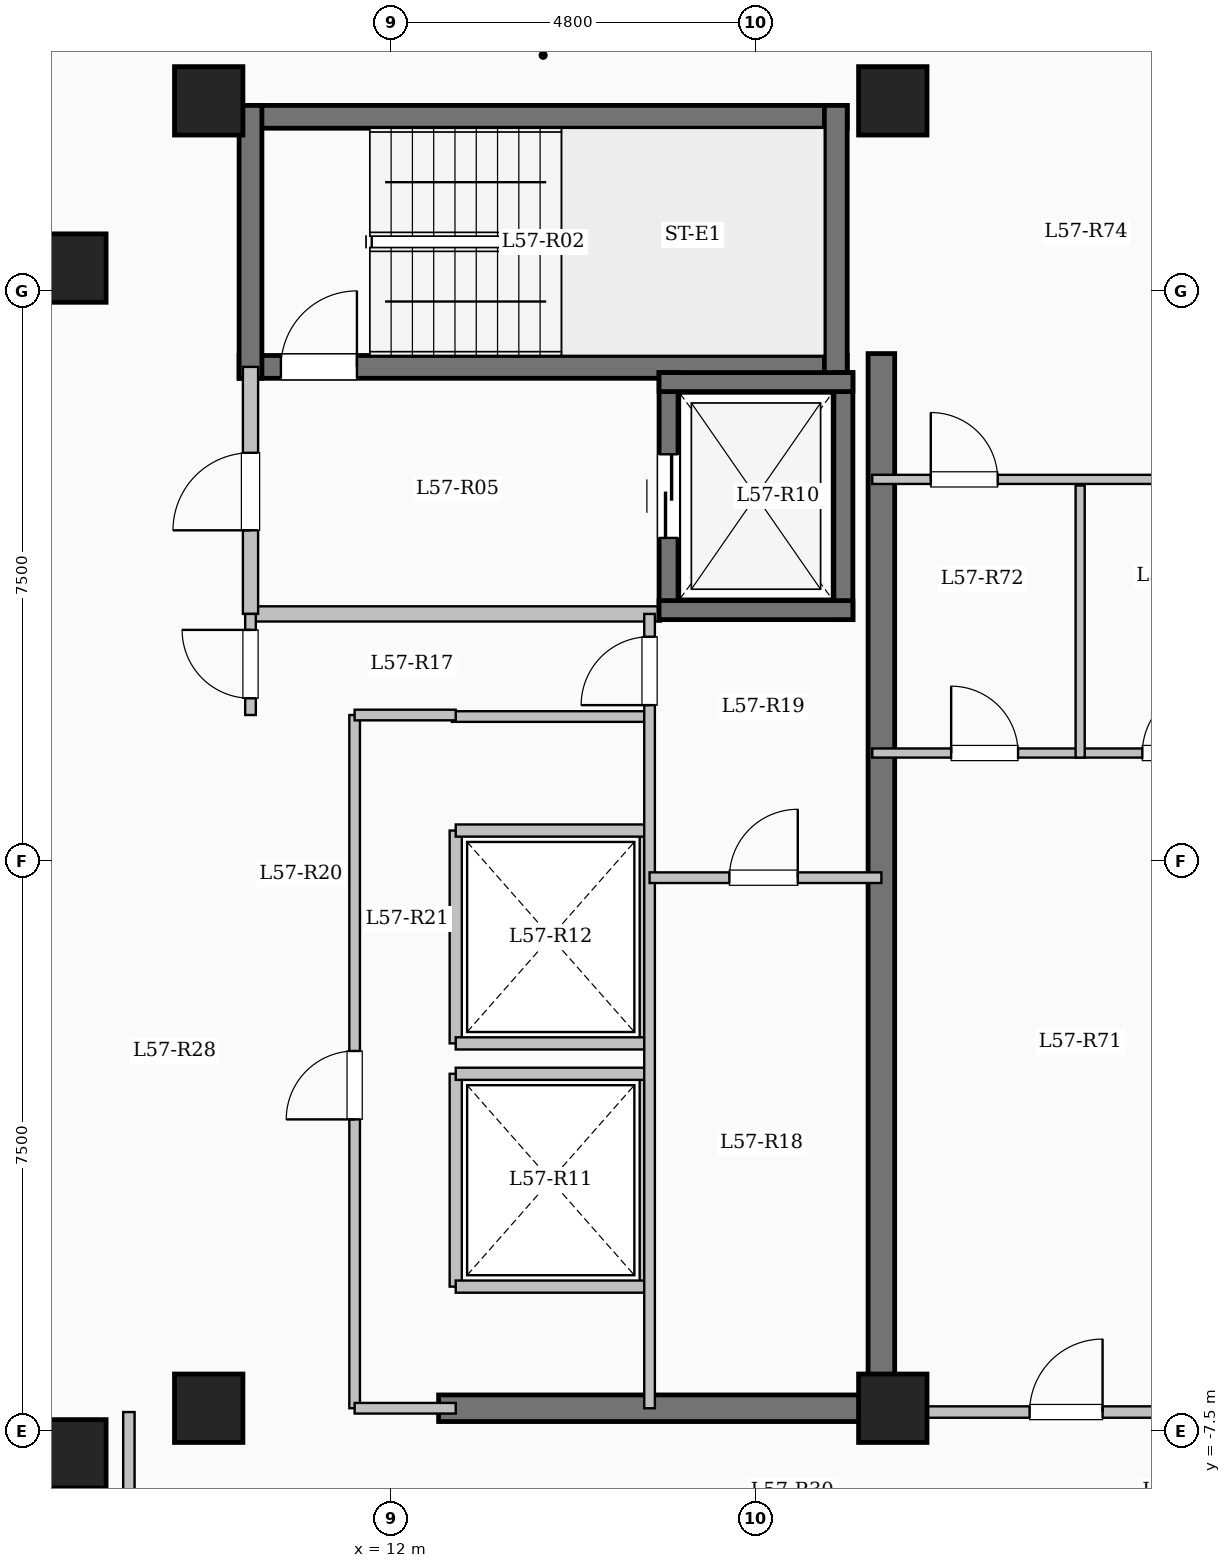
"""IFC4 building model, lengths in metres.
Left out: names, types, materials, properties, quantities, classifications, styles, units other than length and angle.
Written with IfcOpenShell. Run it as: python <this file> out.ifc"""

import sys

from ifc_helpers import new_model, si_unit, direction, frame, frame_2d, origin, origin_2d, place, context, subcontext, project, spatial, rectangle, extrude, element, fill, save


model = new_model("IFC4")
c1 = context("Model", 3, precision=1e-05, world=origin(), true_north=direction((0.0, 1.0)))
c2 = subcontext(c1, "Body", "Model", "MODEL_VIEW")
j1 = project(units=[si_unit("LENGTHUNIT", "METRE"), si_unit("PLANEANGLEUNIT", "RADIAN")], contexts=[c1])
p1 = place(None, origin())
s1 = spatial("IfcSite", under=j1, at=p1, CompositionType="ELEMENT")
p2 = place(p1, origin())
s2 = spatial("IfcBuilding", under=s1, at=p2, CompositionType="ELEMENT")
p3 = place(p2, frame((0.0, 0.0, 210.35)))
s3 = spatial("IfcBuildingStorey", under=s2, at=p3, CompositionType="ELEMENT", Elevation=210.35)
for number, where, z_axis, x_axis in (
    (1, (7.8, -7.8, 0.0), (0.0, 0.0, 1.0), (1.0, 0.0, 0.0)),
    (2, (7.8, 7.8, 0.0), (0.0, 0.0, 1.0), (1.0, 0.0, 0.0)),
    (3, (9.6, -7.2, 0.0), (0.0, 0.0, 1.0), (1.0, 0.0, 0.0)),
    (4, (9.6, 10.0, 0.0), (0.0, 0.0, 1.0), (1.0, 0.0, 0.0)),
    (5, (18.6, -7.2, 0.0), (0.0, 0.0, 1.0), (1.0, 0.0, 0.0)),
    (6, (18.6, 10.0, 0.0), (0.0, 0.0, 1.0), (1.0, 0.0, 0.0)),
):
    element("IfcColumn", number, at=place(p3, frame(where, z_axis=z_axis, x_axis=x_axis)), inside=s3, PredefinedType="COLUMN", context=c2, shape_type="SweptSolid", body=[
        extrude(rectangle(XDim=0.9, YDim=0.9, at=origin_2d()), origin(), (0.0, 0.0, 1.0), 3.35),
    ])
p4 = place(p3, frame((10.0, 9.79, 0.0), z_axis=(0.0, 0.0, 1.0), x_axis=(1.0, 0.0, 0.0)))
e7 = element("IfcWall", 7, at=p4, inside=s3, PredefinedType="SHEAR", context=c2, shape_type="SweptSolid", body=[
    extrude(rectangle(XDim=8.0, YDim=0.3, at=frame_2d((4.0, 0.0))), origin(), (0.0, 0.0, 1.0), 3.35),
])
p5 = place(p3, frame((10.0, 6.5, 0.0), z_axis=(0.0, 0.0, 1.0), x_axis=(1.0, 0.0, 0.0)))
e8 = element("IfcWall", 8, at=p5, inside=s3, PredefinedType="SHEAR", context=c2, shape_type="SweptSolid", body=[
    extrude(rectangle(XDim=8.0, YDim=0.3, at=frame_2d((4.0, 0.0))), origin(), (0.0, 0.0, 1.0), 3.35),
])
p6 = place(p5, frame((0.55, 0.0, 0.0)))
e9 = element("IfcOpeningElement", 9, at=p6, cuts=e8, PredefinedType="OPENING", context=c2, shape_type="SweptSolid", body=[
    extrude(rectangle(XDim=1.0, YDim=2.15, at=frame_2d((0.5, 1.075))), frame((0.0, 0.16, 0.0), z_axis=(0.0, -1.0, 0.0), x_axis=(1.0, 0.0, 0.0)), (0.0, 0.0, 1.0), 0.32),
])
for number, where, z_axis, x_axis in (
    (10, (10.15, 6.35, 0.0), (0.0, 0.0, 1.0), (0.0, 1.0, 0.0)),
    (11, (17.85, 6.35, 0.0), (0.0, 0.0, 1.0), (0.0, 1.0, 0.0)),
):
    element("IfcWall", number, at=place(p3, frame(where, z_axis=z_axis, x_axis=x_axis)), inside=s3, PredefinedType="SHEAR", context=c2, shape_type="SweptSolid", body=[
        extrude(rectangle(XDim=3.59, YDim=0.3, at=frame_2d((1.795, 0.0))), origin(), (0.0, 0.0, 1.0), 3.35),
    ])
p7 = place(p3, frame((10.15, 3.25, 0.0), z_axis=(0.0, 0.0, 1.0), x_axis=(1.0, 0.0, 0.0)))
e12 = element("IfcWall", 12, at=p7, inside=s3, PredefinedType="SOLIDWALL", context=c2, shape_type="SweptSolid", body=[
    extrude(rectangle(XDim=5.4, YDim=0.2, at=frame_2d((2.7, 0.0))), origin(), (0.0, 0.0, 1.0), 3.1),
])
p8 = place(p3, frame((10.15, 3.25, 0.0), z_axis=(0.0, 0.0, 1.0), x_axis=(0.0, 1.0, 0.0)))
e13 = element("IfcWall", 13, at=p8, inside=s3, PredefinedType="SOLIDWALL", context=c2, shape_type="SweptSolid", body=[
    extrude(rectangle(XDim=3.25, YDim=0.2, at=frame_2d((1.625, 0.0))), origin(), (0.0, 0.0, 1.0), 3.1),
])
p9 = place(p8, frame((1.1, 0.0, 0.0)))
e14 = element("IfcOpeningElement", 14, at=p9, cuts=e13, PredefinedType="OPENING", context=c2, shape_type="SweptSolid", body=[
    extrude(rectangle(XDim=1.02, YDim=2.15, at=frame_2d((0.51, 1.075))), frame((0.0, 0.11, 0.0), z_axis=(0.0, -1.0, 0.0), x_axis=(1.0, 0.0, 0.0)), (0.0, 0.0, 1.0), 0.22),
])
p10 = place(p3, frame((15.65, 3.175, 0.0), z_axis=(0.0, 0.0, 1.0), x_axis=(0.0, 1.0, 0.0)))
e15 = element("IfcWall", 15, at=p10, inside=s3, PredefinedType="SHEAR", context=c2, shape_type="SweptSolid", body=[
    extrude(rectangle(XDim=3.25, YDim=0.25, at=frame_2d((1.625, 0.0))), origin(), (0.0, 0.0, 1.0), 3.35),
])
p11 = place(p10, frame((1.075, 0.0, 0.0)))
e16 = element("IfcOpeningElement", 16, at=p11, cuts=e15, PredefinedType="OPENING", context=c2, shape_type="SweptSolid", body=[
    extrude(rectangle(XDim=1.1, YDim=2.15, at=frame_2d((0.55, 1.075))), frame((0.0, 0.135, 0.0), z_axis=(0.0, -1.0, 0.0), x_axis=(1.0, 0.0, 0.0)), (0.0, 0.0, 1.0), 0.27),
])
p12 = place(p3, frame((17.95, 3.175, 0.0), z_axis=(0.0, 0.0, 1.0), x_axis=(0.0, 1.0, 0.0)))
e17 = element("IfcWall", 17, at=p12, inside=s3, PredefinedType="SHEAR", context=c2, shape_type="SweptSolid", body=[
    extrude(rectangle(XDim=3.25, YDim=0.25, at=frame_2d((1.625, 0.0))), origin(), (0.0, 0.0, 1.0), 3.35),
])
for number, where, z_axis, x_axis in (
    (18, (15.525, 3.3, 0.0), (0.0, 0.0, 1.0), (1.0, 0.0, 0.0)),
    (19, (15.525, 6.3, 0.0), (0.0, 0.0, 1.0), (1.0, 0.0, 0.0)),
):
    element("IfcWall", number, at=place(p3, frame(where, z_axis=z_axis, x_axis=x_axis)), inside=s3, PredefinedType="SHEAR", context=c2, shape_type="SweptSolid", body=[
        extrude(rectangle(XDim=2.55, YDim=0.25, at=frame_2d((1.275, 0.0))), origin(), (0.0, 0.0, 1.0), 3.35),
    ])
for number, where, z_axis, x_axis in (
    (20, (12.85, -5.6, 0.0), (0.0, 0.0, 1.0), (0.0, 1.0, 0.0)),
    (21, (15.35, -5.6, 0.0), (0.0, 0.0, 1.0), (0.0, 1.0, 0.0)),
):
    element("IfcWall", number, at=place(p3, frame(where, z_axis=z_axis, x_axis=x_axis)), inside=s3, PredefinedType="SOLIDWALL", context=c2, shape_type="SweptSolid", body=[
        extrude(rectangle(XDim=2.8, YDim=0.16, at=frame_2d((1.4, 0.0))), origin(), (0.0, 0.0, 1.0), 3.1),
    ])
for number, where, z_axis, x_axis in (
    (22, (12.85, -5.6, 0.0), (0.0, 0.0, 1.0), (1.0, 0.0, 0.0)),
    (23, (12.85, -2.8, 0.0), (0.0, 0.0, 1.0), (1.0, 0.0, 0.0)),
):
    element("IfcWall", number, at=place(p3, frame(where, z_axis=z_axis, x_axis=x_axis)), inside=s3, PredefinedType="SOLIDWALL", context=c2, shape_type="SweptSolid", body=[
        extrude(rectangle(XDim=2.5, YDim=0.16, at=frame_2d((1.25, 0.0))), origin(), (0.0, 0.0, 1.0), 3.1),
    ])
for number, where, z_axis, x_axis in (
    (24, (12.85, -2.4, 0.0), (0.0, 0.0, 1.0), (0.0, 1.0, 0.0)),
    (25, (15.35, -2.4, 0.0), (0.0, 0.0, 1.0), (0.0, 1.0, 0.0)),
):
    element("IfcWall", number, at=place(p3, frame(where, z_axis=z_axis, x_axis=x_axis)), inside=s3, PredefinedType="SOLIDWALL", context=c2, shape_type="SweptSolid", body=[
        extrude(rectangle(XDim=2.8, YDim=0.16, at=frame_2d((1.4, 0.0))), origin(), (0.0, 0.0, 1.0), 3.1),
    ])
for number, where, z_axis, x_axis in (
    (26, (12.85, -2.4, 0.0), (0.0, 0.0, 1.0), (1.0, 0.0, 0.0)),
    (27, (12.85, 0.4, 0.0), (0.0, 0.0, 1.0), (1.0, 0.0, 0.0)),
):
    element("IfcWall", number, at=place(p3, frame(where, z_axis=z_axis, x_axis=x_axis)), inside=s3, PredefinedType="SOLIDWALL", context=c2, shape_type="SweptSolid", body=[
        extrude(rectangle(XDim=2.5, YDim=0.16, at=frame_2d((1.25, 0.0))), origin(), (0.0, 0.0, 1.0), 3.1),
    ])
p13 = place(p3, frame((18.45, -7.375, 0.0), z_axis=(0.0, 0.0, 1.0), x_axis=(0.0, 1.0, 0.0)))
e28 = element("IfcWall", 28, at=p13, inside=s3, PredefinedType="SHEAR", context=c2, shape_type="SweptSolid", body=[
    extrude(rectangle(XDim=14.05, YDim=0.35, at=frame_2d((7.025, 0.0))), origin(), (0.0, 0.0, 1.0), 3.35),
])
p14 = place(p3, frame((12.625, -7.2, 0.0), z_axis=(0.0, 0.0, 1.0), x_axis=(1.0, 0.0, 0.0)))
e29 = element("IfcWall", 29, at=p14, inside=s3, PredefinedType="SHEAR", context=c2, shape_type="SweptSolid", body=[
    extrude(rectangle(XDim=6.0, YDim=0.35, at=frame_2d((3.0, 0.0))), origin(), (0.0, 0.0, 1.0), 3.35),
])
p15 = place(p3, frame((12.8, 1.9, 0.0), z_axis=(0.0, 0.0, 1.0), x_axis=(1.0, 0.0, 0.0)))
e30 = element("IfcWall", 30, at=p15, inside=s3, PredefinedType="PARTITIONING", context=c2, shape_type="SweptSolid", body=[
    extrude(rectangle(XDim=2.6, YDim=0.14, at=frame_2d((1.3, 0.0))), origin(), (0.0, 0.0, 1.0), 3.1),
])
p16 = place(p3, frame((10.15, 1.92, 0.0), z_axis=(0.0, 0.0, 1.0), x_axis=(0.0, 1.0, 0.0)))
e31 = element("IfcWall", 31, at=p16, inside=s3, PredefinedType="PARTITIONING", context=c2, shape_type="SweptSolid", body=[
    extrude(rectangle(XDim=1.33, YDim=0.14, at=frame_2d((0.665, 0.0))), origin(), (0.0, 0.0, 1.0), 3.1),
])
p17 = place(p16, frame((0.22, 0.0, 0.0)))
e32 = element("IfcOpeningElement", 32, at=p17, cuts=e31, PredefinedType="OPENING", context=c2, shape_type="SweptSolid", body=[
    extrude(rectangle(XDim=0.9, YDim=2.08, at=frame_2d((0.45, 1.04))), frame((0.0, 0.08, 0.0), z_axis=(0.0, -1.0, 0.0), x_axis=(1.0, 0.0, 0.0)), (0.0, 0.0, 1.0), 0.16),
])
p18 = place(p3, frame((15.4, -7.2, 0.0), z_axis=(0.0, 0.0, 1.0), x_axis=(0.0, 1.0, 0.0)))
e33 = element("IfcWall", 33, at=p18, inside=s3, PredefinedType="PARTITIONING", context=c2, shape_type="SweptSolid", body=[
    extrude(rectangle(XDim=10.45, YDim=0.14, at=frame_2d((5.225, 0.0))), origin(), (0.0, 0.0, 1.0), 3.1),
])
p19 = place(p18, frame((9.25, 0.0, 0.0)))
e34 = element("IfcOpeningElement", 34, at=p19, cuts=e33, PredefinedType="OPENING", context=c2, shape_type="SweptSolid", body=[
    extrude(rectangle(XDim=0.9, YDim=2.08, at=frame_2d((0.45, 1.04))), frame((0.0, 0.08, 0.0), z_axis=(0.0, -1.0, 0.0), x_axis=(1.0, 0.0, 0.0)), (0.0, 0.0, 1.0), 0.16),
])
p20 = place(p3, frame((15.4, -0.22, 0.0), z_axis=(0.0, 0.0, 1.0), x_axis=(1.0, 0.0, 0.0)))
e35 = element("IfcWall", 35, at=p20, inside=s3, PredefinedType="PARTITIONING", context=c2, shape_type="SweptSolid", body=[
    extrude(rectangle(XDim=3.05, YDim=0.14, at=frame_2d((1.525, 0.0))), origin(), (0.0, 0.0, 1.0), 3.1),
])
p21 = place(p20, frame((1.05, 0.0, 0.0)))
e36 = element("IfcOpeningElement", 36, at=p21, cuts=e35, PredefinedType="OPENING", context=c2, shape_type="SweptSolid", body=[
    extrude(rectangle(XDim=0.9, YDim=2.08, at=frame_2d((0.45, 1.04))), frame((0.0, 0.08, 0.0), z_axis=(0.0, -1.0, 0.0), x_axis=(1.0, 0.0, 0.0)), (0.0, 0.0, 1.0), 0.16),
])
p22 = place(p3, frame((11.52, -7.2, 0.0), z_axis=(0.0, 0.0, 1.0), x_axis=(0.0, 1.0, 0.0)))
e37 = element("IfcWall", 37, at=p22, inside=s3, PredefinedType="PARTITIONING", context=c2, shape_type="SweptSolid", body=[
    extrude(rectangle(XDim=9.12, YDim=0.14, at=frame_2d((4.56, 0.0))), origin(), (0.0, 0.0, 1.0), 3.1),
])
p23 = place(p22, frame((3.8, 0.0, 0.0)))
e38 = element("IfcOpeningElement", 38, at=p23, cuts=e37, PredefinedType="OPENING", context=c2, shape_type="SweptSolid", body=[
    extrude(rectangle(XDim=0.9, YDim=2.08, at=frame_2d((0.45, 1.04))), frame((0.0, 0.08, 0.0), z_axis=(0.0, -1.0, 0.0), x_axis=(1.0, 0.0, 0.0)), (0.0, 0.0, 1.0), 0.16),
])
p24 = place(p3, frame((11.52, 1.92, 0.0), z_axis=(0.0, 0.0, 1.0), x_axis=(1.0, 0.0, 0.0)))
e39 = element("IfcWall", 39, at=p24, inside=s3, PredefinedType="PARTITIONING", context=c2, shape_type="SweptSolid", body=[
    extrude(rectangle(XDim=1.33, YDim=0.14, at=frame_2d((0.665, 0.0))), origin(), (0.0, 0.0, 1.0), 3.1),
])
p25 = place(p3, frame((11.52, -7.2, 0.0), z_axis=(0.0, 0.0, 1.0), x_axis=(1.0, 0.0, 0.0)))
e40 = element("IfcWall", 40, at=p25, inside=s3, PredefinedType="PARTITIONING", context=c2, shape_type="SweptSolid", body=[
    extrude(rectangle(XDim=1.33, YDim=0.14, at=frame_2d((0.665, 0.0))), origin(), (0.0, 0.0, 1.0), 2.235),
])
p26 = place(p3, frame((8.55, -9.4, 0.0), z_axis=(0.0, 0.0, 1.0), x_axis=(0.0, 1.0, 0.0)))
e41 = element("IfcWall", 41, at=p26, inside=s3, PredefinedType="PARTITIONING", context=c2, shape_type="SweptSolid", body=[
    extrude(rectangle(XDim=2.15, YDim=0.15, at=frame_2d((1.075, 0.0))), origin(), (0.0, 0.0, 1.0), 3.1),
])
p27 = place(p3, frame((18.45, -7.25, 0.0), z_axis=(0.0, 0.0, 1.0), x_axis=(1.0, 0.0, 0.0)))
e42 = element("IfcWall", 42, at=p27, inside=s3, PredefinedType="PARTITIONING", context=c2, shape_type="SweptSolid", body=[
    extrude(rectangle(XDim=5.13, YDim=0.15, at=frame_2d((2.565, 0.0))), origin(), (0.0, 0.0, 1.0), 3.1),
])
p28 = place(p27, frame((1.95, 0.0, 0.0)))
e43 = element("IfcOpeningElement", 43, at=p28, cuts=e42, PredefinedType="OPENING", context=c2, shape_type="SweptSolid", body=[
    extrude(rectangle(XDim=0.96, YDim=2.15, at=frame_2d((0.48, 1.075))), frame((0.0, 0.085, 0.0), z_axis=(0.0, -1.0, 0.0), x_axis=(1.0, 0.0, 0.0)), (0.0, 0.0, 1.0), 0.17),
])
p29 = place(p3, frame((18.33, 1.42, 0.0), z_axis=(0.0, 0.0, 1.0), x_axis=(1.0, 0.0, 0.0)))
e44 = element("IfcWall", 44, at=p29, inside=s3, PredefinedType="PARTITIONING", context=c2, shape_type="SweptSolid", body=[
    extrude(rectangle(XDim=5.37, YDim=0.12, at=frame_2d((2.685, 0.0))), origin(), (0.0, 0.0, 1.0), 3.1),
])
p30 = place(p29, frame((1.038, 0.0, 0.0)))
e45 = element("IfcOpeningElement", 45, at=p30, cuts=e44, PredefinedType="OPENING", context=c2, shape_type="SweptSolid", body=[
    extrude(rectangle(XDim=0.88, YDim=2.1, at=frame_2d((0.44, 1.05))), frame((0.0, 0.07, 0.0), z_axis=(0.0, -1.0, 0.0), x_axis=(1.0, 0.0, 0.0)), (0.0, 0.0, 1.0), 0.14),
])
p31 = place(p29, frame((3.553, 0.0, 0.0)))
e46 = element("IfcOpeningElement", 46, at=p31, cuts=e44, PredefinedType="OPENING", context=c2, shape_type="SweptSolid", body=[
    extrude(rectangle(XDim=0.88, YDim=2.1, at=frame_2d((0.44, 1.05))), frame((0.0, 0.07, 0.0), z_axis=(0.0, -1.0, 0.0), x_axis=(1.0, 0.0, 0.0)), (0.0, 0.0, 1.0), 0.14),
])
p32 = place(p3, frame((18.33, 5.02, 0.0), z_axis=(0.0, 0.0, 1.0), x_axis=(1.0, 0.0, 0.0)))
e47 = element("IfcWall", 47, at=p32, inside=s3, PredefinedType="PARTITIONING", context=c2, shape_type="SweptSolid", body=[
    extrude(rectangle(XDim=5.37, YDim=0.12, at=frame_2d((2.685, 0.0))), origin(), (0.0, 0.0, 1.0), 3.1),
])
p33 = place(p32, frame((0.77, 0.0, 0.0)))
e48 = element("IfcOpeningElement", 48, at=p33, cuts=e47, PredefinedType="OPENING", context=c2, shape_type="SweptSolid", body=[
    extrude(rectangle(XDim=0.88, YDim=2.1, at=frame_2d((0.44, 1.05))), frame((0.0, 0.07, 0.0), z_axis=(0.0, -1.0, 0.0), x_axis=(1.0, 0.0, 0.0)), (0.0, 0.0, 1.0), 0.14),
])
p34 = place(p3, frame((21.065, 1.36, 0.0), z_axis=(0.0, 0.0, 1.0), x_axis=(0.0, 1.0, 0.0)))
e49 = element("IfcWall", 49, at=p34, inside=s3, PredefinedType="PARTITIONING", context=c2, shape_type="SweptSolid", body=[
    extrude(rectangle(XDim=3.58, YDim=0.12, at=frame_2d((1.79, 0.0))), origin(), (0.0, 0.0, 1.0), 3.1),
])
p35 = place(p6, origin())
e50 = element("IfcDoor", 50, at=p35, inside=s3, OperationType="SINGLE_SWING_RIGHT", PredefinedType="DOOR", context=c2, shape_type="SweptSolid", body=[
    extrude(rectangle(XDim=1.0, YDim=2.15, at=frame_2d((0.5, 1.075))), frame((0.0, 0.025, 0.0), z_axis=(0.0, -1.0, 0.0), x_axis=(1.0, 0.0, 0.0)), (0.0, 0.0, 1.0), 0.05),
])
fill(e9, e50)
p36 = place(p9, origin())
e51 = element("IfcDoor", 51, at=p36, inside=s3, OperationType="SINGLE_SWING_LEFT", PredefinedType="DOOR", context=c2, shape_type="SweptSolid", body=[
    extrude(rectangle(XDim=1.02, YDim=2.15, at=frame_2d((0.51, 1.075))), frame((0.0, 0.025, 0.0), z_axis=(0.0, -1.0, 0.0), x_axis=(1.0, 0.0, 0.0)), (0.0, 0.0, 1.0), 0.05),
])
fill(e14, e51)
p37 = place(p11, origin())
e52 = element("IfcDoor", 52, at=p37, inside=s3, OperationType="SLIDING_TO_LEFT", PredefinedType="DOOR", context=c2, shape_type="SweptSolid", body=[
    extrude(rectangle(XDim=1.1, YDim=2.15, at=frame_2d((0.55, 1.075))), frame((0.0, 0.025, 0.0), z_axis=(0.0, -1.0, 0.0), x_axis=(1.0, 0.0, 0.0)), (0.0, 0.0, 1.0), 0.05),
])
fill(e16, e52)
p38 = place(p17, origin())
e53 = element("IfcDoor", 53, at=p38, inside=s3, OperationType="SINGLE_SWING_RIGHT", PredefinedType="DOOR", context=c2, shape_type="SweptSolid", body=[
    extrude(rectangle(XDim=0.9, YDim=2.08, at=frame_2d((0.45, 1.04))), frame((0.0, 0.025, 0.0), z_axis=(0.0, -1.0, 0.0), x_axis=(1.0, 0.0, 0.0)), (0.0, 0.0, 1.0), 0.05),
])
fill(e32, e53)
p39 = place(p19, origin())
e54 = element("IfcDoor", 54, at=p39, inside=s3, OperationType="SINGLE_SWING_LEFT", PredefinedType="DOOR", context=c2, shape_type="SweptSolid", body=[
    extrude(rectangle(XDim=0.9, YDim=2.08, at=frame_2d((0.45, 1.04))), frame((0.0, 0.025, 0.0), z_axis=(0.0, -1.0, 0.0), x_axis=(1.0, 0.0, 0.0)), (0.0, 0.0, 1.0), 0.05),
])
fill(e34, e54)
p40 = place(p21, origin())
e55 = element("IfcDoor", 55, at=p40, inside=s3, OperationType="SINGLE_SWING_RIGHT", PredefinedType="DOOR", context=c2, shape_type="SweptSolid", body=[
    extrude(rectangle(XDim=0.9, YDim=2.08, at=frame_2d((0.45, 1.04))), frame((0.0, 0.025, 0.0), z_axis=(0.0, -1.0, 0.0), x_axis=(1.0, 0.0, 0.0)), (0.0, 0.0, 1.0), 0.05),
])
fill(e36, e55)
p41 = place(p23, origin())
e56 = element("IfcDoor", 56, at=p41, inside=s3, OperationType="SINGLE_SWING_LEFT", PredefinedType="DOOR", context=c2, shape_type="SweptSolid", body=[
    extrude(rectangle(XDim=0.9, YDim=2.08, at=frame_2d((0.45, 1.04))), frame((0.0, 0.025, 0.0), z_axis=(0.0, -1.0, 0.0), x_axis=(1.0, 0.0, 0.0)), (0.0, 0.0, 1.0), 0.05),
])
fill(e38, e56)
p42 = place(p28, origin())
e57 = element("IfcDoor", 57, at=p42, inside=s3, OperationType="SINGLE_SWING_RIGHT", PredefinedType="DOOR", context=c2, shape_type="SweptSolid", body=[
    extrude(rectangle(XDim=0.96, YDim=2.15, at=frame_2d((0.48, 1.075))), frame((0.0, 0.025, 0.0), z_axis=(0.0, -1.0, 0.0), x_axis=(1.0, 0.0, 0.0)), (0.0, 0.0, 1.0), 0.05),
])
fill(e43, e57)
p43 = place(p30, origin())
e58 = element("IfcDoor", 58, at=p43, inside=s3, OperationType="SINGLE_SWING_LEFT", PredefinedType="DOOR", context=c2, shape_type="SweptSolid", body=[
    extrude(rectangle(XDim=0.88, YDim=2.1, at=frame_2d((0.44, 1.05))), frame((0.0, 0.025, 0.0), z_axis=(0.0, -1.0, 0.0), x_axis=(1.0, 0.0, 0.0)), (0.0, 0.0, 1.0), 0.05),
])
fill(e45, e58)
p44 = place(p31, origin())
e59 = element("IfcDoor", 59, at=p44, inside=s3, OperationType="SINGLE_SWING_RIGHT", PredefinedType="DOOR", context=c2, shape_type="SweptSolid", body=[
    extrude(rectangle(XDim=0.88, YDim=2.1, at=frame_2d((0.44, 1.05))), frame((0.0, 0.025, 0.0), z_axis=(0.0, -1.0, 0.0), x_axis=(1.0, 0.0, 0.0)), (0.0, 0.0, 1.0), 0.05),
])
fill(e46, e59)
p45 = place(p33, origin())
e60 = element("IfcDoor", 60, at=p45, inside=s3, OperationType="SINGLE_SWING_LEFT", PredefinedType="DOOR", context=c2, shape_type="SweptSolid", body=[
    extrude(rectangle(XDim=0.88, YDim=2.1, at=frame_2d((0.44, 1.05))), frame((0.0, 0.025, 0.0), z_axis=(0.0, -1.0, 0.0), x_axis=(1.0, 0.0, 0.0)), (0.0, 0.0, 1.0), 0.05),
])
fill(e48, e60)
save(model, sys.argv[1])
